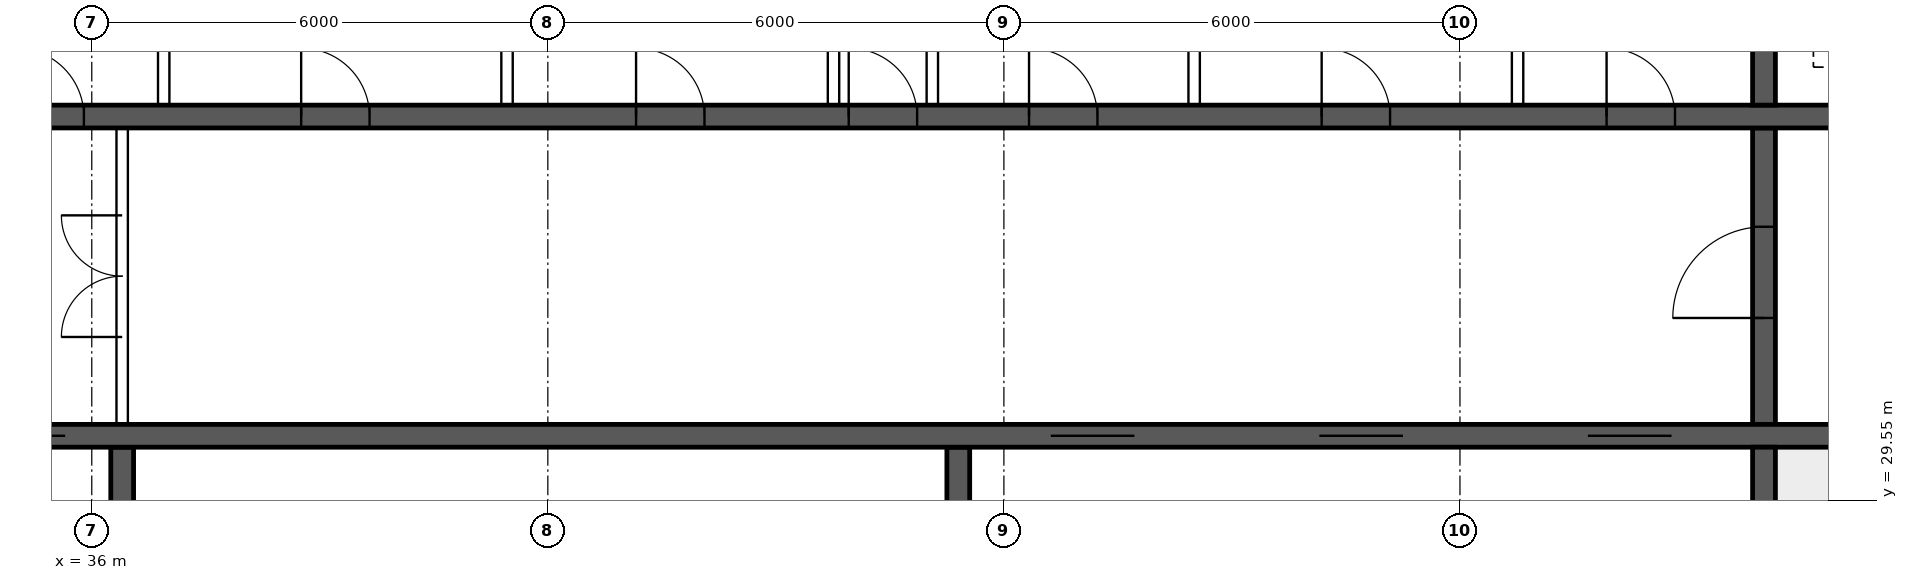
"""IFC4 building model, lengths in metres.
Left out: names, types, materials, properties, quantities, classifications, styles, units other than length and angle.
Written with IfcOpenShell. Run it as: python <this file> out.ifc"""

import sys

from ifc_helpers import new_model, si_unit, direction, frame, frame_2d, origin, place, context, subcontext, project, spatial, rectangle, extrude, element, fill, save


model = new_model("IFC4")
c1 = context("Model", 3, precision=1e-05, world=origin(), true_north=direction((0.0, 1.0)))
c2 = subcontext(c1, "Body", "Model", "MODEL_VIEW")
j1 = project(units=[si_unit("LENGTHUNIT", "METRE"), si_unit("PLANEANGLEUNIT", "RADIAN")], contexts=[c1])
p1 = place(None, origin())
s1 = spatial("IfcSite", under=j1, at=p1, CompositionType="ELEMENT")
p2 = place(p1, origin())
s2 = spatial("IfcBuilding", under=s1, at=p2, CompositionType="ELEMENT")
p3 = place(p2, frame((0.0, 0.0, 23.95)))
s3 = spatial("IfcBuildingStorey", under=s2, at=p3, CompositionType="ELEMENT", Elevation=23.95)
p4 = place(p3, frame((18.5, 30.4, 0.0), z_axis=(0.0, 0.0, 1.0), x_axis=(1.0, 0.0, 0.0)))
e1 = element("IfcWall", 1, at=p4, inside=s3, PredefinedType="SHEAR", context=c2, shape_type="SweptSolid", body=[
    extrude(rectangle(XDim=47.0, YDim=0.3, at=frame_2d((23.5, 0.0))), origin(), (0.0, 0.0, 1.0), 3.75),
])
p5 = place(p4, frame((0.4, 0.0, 0.0)))
e2 = element("IfcOpeningElement", 2, at=p5, cuts=e1, PredefinedType="OPENING", context=c2, shape_type="SweptSolid", body=[
    extrude(rectangle(XDim=1.0, YDim=2.1, at=frame_2d((0.5, 1.05))), frame((0.0, 0.16, 0.0), z_axis=(0.0, -1.0, 0.0), x_axis=(1.0, 0.0, 0.0)), (0.0, 0.0, 1.0), 0.32),
])
p6 = place(p4, frame((45.6, 0.0, 0.0)))
e3 = element("IfcOpeningElement", 3, at=p6, cuts=e1, PredefinedType="OPENING", context=c2, shape_type="SweptSolid", body=[
    extrude(rectangle(XDim=1.0, YDim=2.1, at=frame_2d((0.5, 1.05))), frame((0.0, 0.16, 0.0), z_axis=(0.0, -1.0, 0.0), x_axis=(1.0, 0.0, 0.0)), (0.0, 0.0, 1.0), 0.32),
])
p7 = place(p4, frame((8.25, 0.0, 0.0)))
e4 = element("IfcOpeningElement", 4, at=p7, cuts=e1, PredefinedType="OPENING", context=c2, shape_type="SweptSolid", body=[
    extrude(rectangle(XDim=1.1, YDim=2.1, at=frame_2d((0.55, 1.05))), frame((0.0, 0.16, 0.0), z_axis=(0.0, -1.0, 0.0), x_axis=(1.0, 0.0, 0.0)), (0.0, 0.0, 1.0), 0.32),
])
p8 = place(p4, frame((10.85, 0.0, 0.0)))
e5 = element("IfcOpeningElement", 5, at=p8, cuts=e1, PredefinedType="OPENING", context=c2, shape_type="SweptSolid", body=[
    extrude(rectangle(XDim=1.1, YDim=2.1, at=frame_2d((0.55, 1.05))), frame((0.0, 0.16, 0.0), z_axis=(0.0, -1.0, 0.0), x_axis=(1.0, 0.0, 0.0)), (0.0, 0.0, 1.0), 0.32),
])
p9 = place(p4, frame((13.45, 0.0, 0.0)))
e6 = element("IfcOpeningElement", 6, at=p9, cuts=e1, PredefinedType="OPENING", context=c2, shape_type="SweptSolid", body=[
    extrude(rectangle(XDim=1.1, YDim=2.1, at=frame_2d((0.55, 1.05))), frame((0.0, 0.16, 0.0), z_axis=(0.0, -1.0, 0.0), x_axis=(1.0, 0.0, 0.0)), (0.0, 0.0, 1.0), 0.32),
])
p10 = place(p4, frame((16.05, 0.0, 0.0)))
e7 = element("IfcOpeningElement", 7, at=p10, cuts=e1, PredefinedType="OPENING", context=c2, shape_type="SweptSolid", body=[
    extrude(rectangle(XDim=1.1, YDim=2.1, at=frame_2d((0.55, 1.05))), frame((0.0, 0.16, 0.0), z_axis=(0.0, -1.0, 0.0), x_axis=(1.0, 0.0, 0.0)), (0.0, 0.0, 1.0), 0.32),
])
p11 = place(p4, frame((30.117, 0.0, 0.0)))
e8 = element("IfcOpeningElement", 8, at=p11, cuts=e1, PredefinedType="OPENING", context=c2, shape_type="SweptSolid", body=[
    extrude(rectangle(XDim=1.1, YDim=2.1, at=frame_2d((0.55, 1.05))), frame((0.0, 0.16, 0.0), z_axis=(0.0, -1.0, 0.0), x_axis=(1.0, 0.0, 0.0)), (0.0, 0.0, 1.0), 0.32),
])
p12 = place(p4, frame((33.65, 0.0, 0.0)))
e9 = element("IfcOpeningElement", 9, at=p12, cuts=e1, PredefinedType="OPENING", context=c2, shape_type="SweptSolid", body=[
    extrude(rectangle(XDim=1.1, YDim=2.1, at=frame_2d((0.55, 1.05))), frame((0.0, 0.16, 0.0), z_axis=(0.0, -1.0, 0.0), x_axis=(1.0, 0.0, 0.0)), (0.0, 0.0, 1.0), 0.32),
])
p13 = place(p4, frame((37.183, 0.0, 0.0)))
e10 = element("IfcOpeningElement", 10, at=p13, cuts=e1, PredefinedType="OPENING", context=c2, shape_type="SweptSolid", body=[
    extrude(rectangle(XDim=1.1, YDim=2.1, at=frame_2d((0.55, 1.05))), frame((0.0, 0.16, 0.0), z_axis=(0.0, -1.0, 0.0), x_axis=(1.0, 0.0, 0.0)), (0.0, 0.0, 1.0), 0.32),
])
p14 = place(p3, frame((18.5, 34.6, 0.0), z_axis=(0.0, 0.0, 1.0), x_axis=(1.0, 0.0, 0.0)))
e11 = element("IfcWall", 11, at=p14, inside=s3, PredefinedType="SHEAR", context=c2, shape_type="SweptSolid", body=[
    extrude(rectangle(XDim=47.0, YDim=0.3, at=frame_2d((23.5, 0.0))), origin(), (0.0, 0.0, 1.0), 3.75),
])
p15 = place(p14, frame((0.9, 0.0, 0.0)))
e12 = element("IfcOpeningElement", 12, at=p15, cuts=e11, PredefinedType="OPENING", context=c2, shape_type="SweptSolid", body=[
    extrude(rectangle(XDim=1.1, YDim=2.1, at=frame_2d((0.55, 1.05))), frame((0.0, 0.16, 0.0), z_axis=(0.0, -1.0, 0.0), x_axis=(1.0, 0.0, 0.0)), (0.0, 0.0, 1.0), 0.32),
])
p16 = place(p14, frame((45.0, 0.0, 0.0)))
e13 = element("IfcOpeningElement", 13, at=p16, cuts=e11, PredefinedType="OPENING", context=c2, shape_type="SweptSolid", body=[
    extrude(rectangle(XDim=1.1, YDim=2.1, at=frame_2d((0.55, 1.05))), frame((0.0, 0.16, 0.0), z_axis=(0.0, -1.0, 0.0), x_axis=(1.0, 0.0, 0.0)), (0.0, 0.0, 1.0), 0.32),
])
p17 = place(p14, frame((4.1, 0.0, 0.0)))
e14 = element("IfcOpeningElement", 14, at=p17, cuts=e11, PredefinedType="OPENING", context=c2, shape_type="SweptSolid", body=[
    extrude(rectangle(XDim=0.9, YDim=2.1, at=frame_2d((0.45, 1.05))), frame((0.0, 0.16, 0.0), z_axis=(0.0, -1.0, 0.0), x_axis=(1.0, 0.0, 0.0)), (0.0, 0.0, 1.0), 0.32),
])
p18 = place(p14, frame((42.0, 0.0, 0.0)))
e15 = element("IfcOpeningElement", 15, at=p18, cuts=e11, PredefinedType="OPENING", context=c2, shape_type="SweptSolid", body=[
    extrude(rectangle(XDim=0.9, YDim=2.1, at=frame_2d((0.45, 1.05))), frame((0.0, 0.16, 0.0), z_axis=(0.0, -1.0, 0.0), x_axis=(1.0, 0.0, 0.0)), (0.0, 0.0, 1.0), 0.32),
])
p19 = place(p14, frame((8.875, 0.0, 0.0)))
e16 = element("IfcOpeningElement", 16, at=p19, cuts=e11, PredefinedType="OPENING", context=c2, shape_type="SweptSolid", body=[
    extrude(rectangle(XDim=0.9, YDim=2.1, at=frame_2d((0.45, 1.05))), frame((0.0, 0.16, 0.0), z_axis=(0.0, -1.0, 0.0), x_axis=(1.0, 0.0, 0.0)), (0.0, 0.0, 1.0), 0.32),
])
p20 = place(p14, frame((12.849, 0.0, 0.0)))
e17 = element("IfcOpeningElement", 17, at=p20, cuts=e11, PredefinedType="OPENING", context=c2, shape_type="SweptSolid", body=[
    extrude(rectangle(XDim=0.9, YDim=2.1, at=frame_2d((0.45, 1.05))), frame((0.0, 0.16, 0.0), z_axis=(0.0, -1.0, 0.0), x_axis=(1.0, 0.0, 0.0)), (0.0, 0.0, 1.0), 0.32),
])
p21 = place(p14, frame((16.496, 0.0, 0.0)))
e18 = element("IfcOpeningElement", 18, at=p21, cuts=e11, PredefinedType="OPENING", context=c2, shape_type="SweptSolid", body=[
    extrude(rectangle(XDim=0.9, YDim=2.1, at=frame_2d((0.45, 1.05))), frame((0.0, 0.16, 0.0), z_axis=(0.0, -1.0, 0.0), x_axis=(1.0, 0.0, 0.0)), (0.0, 0.0, 1.0), 0.32),
])
p22 = place(p14, frame((20.255, 0.0, 0.0)))
e19 = element("IfcOpeningElement", 19, at=p22, cuts=e11, PredefinedType="OPENING", context=c2, shape_type="SweptSolid", body=[
    extrude(rectangle(XDim=0.9, YDim=2.1, at=frame_2d((0.45, 1.05))), frame((0.0, 0.16, 0.0), z_axis=(0.0, -1.0, 0.0), x_axis=(1.0, 0.0, 0.0)), (0.0, 0.0, 1.0), 0.32),
])
p23 = place(p14, frame((24.661, 0.0, 0.0)))
e20 = element("IfcOpeningElement", 20, at=p23, cuts=e11, PredefinedType="OPENING", context=c2, shape_type="SweptSolid", body=[
    extrude(rectangle(XDim=0.9, YDim=2.1, at=frame_2d((0.45, 1.05))), frame((0.0, 0.16, 0.0), z_axis=(0.0, -1.0, 0.0), x_axis=(1.0, 0.0, 0.0)), (0.0, 0.0, 1.0), 0.32),
])
p24 = place(p14, frame((27.458, 0.0, 0.0)))
e21 = element("IfcOpeningElement", 21, at=p24, cuts=e11, PredefinedType="OPENING", context=c2, shape_type="SweptSolid", body=[
    extrude(rectangle(XDim=0.9, YDim=2.1, at=frame_2d((0.45, 1.05))), frame((0.0, 0.16, 0.0), z_axis=(0.0, -1.0, 0.0), x_axis=(1.0, 0.0, 0.0)), (0.0, 0.0, 1.0), 0.32),
])
p25 = place(p14, frame((29.831, 0.0, 0.0)))
e22 = element("IfcOpeningElement", 22, at=p25, cuts=e11, PredefinedType="OPENING", context=c2, shape_type="SweptSolid", body=[
    extrude(rectangle(XDim=0.9, YDim=2.1, at=frame_2d((0.45, 1.05))), frame((0.0, 0.16, 0.0), z_axis=(0.0, -1.0, 0.0), x_axis=(1.0, 0.0, 0.0)), (0.0, 0.0, 1.0), 0.32),
])
p26 = place(p14, frame((33.68, 0.0, 0.0)))
e23 = element("IfcOpeningElement", 23, at=p26, cuts=e11, PredefinedType="OPENING", context=c2, shape_type="SweptSolid", body=[
    extrude(rectangle(XDim=0.9, YDim=2.1, at=frame_2d((0.45, 1.05))), frame((0.0, 0.16, 0.0), z_axis=(0.0, -1.0, 0.0), x_axis=(1.0, 0.0, 0.0)), (0.0, 0.0, 1.0), 0.32),
])
p27 = place(p14, frame((37.429, 0.0, 0.0)))
e24 = element("IfcOpeningElement", 24, at=p27, cuts=e11, PredefinedType="OPENING", context=c2, shape_type="SweptSolid", body=[
    extrude(rectangle(XDim=0.9, YDim=2.1, at=frame_2d((0.45, 1.05))), frame((0.0, 0.16, 0.0), z_axis=(0.0, -1.0, 0.0), x_axis=(1.0, 0.0, 0.0)), (0.0, 0.0, 1.0), 0.32),
])
p28 = place(p3, frame((58.0, 26.3, 0.0), z_axis=(0.0, 0.0, 1.0), x_axis=(0.0, 1.0, 0.0)))
e25 = element("IfcWall", 25, at=p28, inside=s3, PredefinedType="SHEAR", context=c2, shape_type="SweptSolid", body=[
    extrude(rectangle(XDim=3.95, YDim=0.3, at=frame_2d((1.975, 0.0))), origin(), (0.0, 0.0, 1.0), 3.75),
])
p29 = place(p3, frame((58.0, 30.55, 0.0), z_axis=(0.0, 0.0, 1.0), x_axis=(0.0, 1.0, 0.0)))
e26 = element("IfcWall", 26, at=p29, inside=s3, PredefinedType="SHEAR", context=c2, shape_type="SweptSolid", body=[
    extrude(rectangle(XDim=3.9, YDim=0.3, at=frame_2d((1.95, 0.0))), origin(), (0.0, 0.0, 1.0), 3.75),
])
p30 = place(p29, frame((1.4, 0.0, 0.0)))
e27 = element("IfcOpeningElement", 27, at=p30, cuts=e26, PredefinedType="OPENING", context=c2, shape_type="SweptSolid", body=[
    extrude(rectangle(XDim=1.2, YDim=2.1, at=frame_2d((0.6, 1.05))), frame((0.0, 0.16, 0.0), z_axis=(0.0, -1.0, 0.0), x_axis=(1.0, 0.0, 0.0)), (0.0, 0.0, 1.0), 0.32),
])
p31 = place(p3, frame((58.0, 34.75, 0.0), z_axis=(0.0, 0.0, 1.0), x_axis=(0.0, 1.0, 0.0)))
e28 = element("IfcWall", 28, at=p31, inside=s3, PredefinedType="SHEAR", context=c2, shape_type="SweptSolid", body=[
    extrude(rectangle(XDim=2.95, YDim=0.3, at=frame_2d((1.475, 0.0))), origin(), (0.0, 0.0, 1.0), 3.75),
])
for number, where, z_axis, x_axis in (
    (29, (36.4, 26.3, 0.0), (0.0, 0.0, 1.0), (0.0, 1.0, 0.0)),
    (30, (47.4, 26.3, 0.0), (0.0, 0.0, 1.0), (0.0, 1.0, 0.0)),
):
    element("IfcWall", number, at=place(p3, frame(where, z_axis=z_axis, x_axis=x_axis)), inside=s3, PredefinedType="SHEAR", context=c2, shape_type="SweptSolid", body=[
        extrude(rectangle(XDim=3.95, YDim=0.3, at=frame_2d((1.975, 0.0))), origin(), (0.0, 0.0, 1.0), 3.75),
    ])
p32 = place(p3, frame((36.4, 30.55, 0.0), z_axis=(0.0, 0.0, 1.0), x_axis=(0.0, 1.0, 0.0)))
e31 = element("IfcWall", 31, at=p32, inside=s3, PredefinedType="SOLIDWALL", context=c2, shape_type="SweptSolid", body=[
    extrude(rectangle(XDim=3.9, YDim=0.15, at=frame_2d((1.95, 0.0))), origin(), (0.0, 0.0, 1.0), 3.5),
])
p33 = place(p32, frame((1.15, 0.0, 0.0)))
e32 = element("IfcOpeningElement", 32, at=p33, cuts=e31, PredefinedType="OPENING", context=c2, shape_type="SweptSolid", body=[
    extrude(rectangle(XDim=1.6, YDim=2.1, at=frame_2d((0.8, 1.05))), frame((0.0, 0.085, 0.0), z_axis=(0.0, -1.0, 0.0), x_axis=(1.0, 0.0, 0.0)), (0.0, 0.0, 1.0), 0.17),
])
for number, where, z_axis, x_axis in (
    (33, (36.946, 34.75, 0.0), (0.0, 0.0, 1.0), (0.0, 1.0, 0.0)),
    (34, (41.463, 34.75, 0.0), (0.0, 0.0, 1.0), (0.0, 1.0, 0.0)),
    (35, (45.758, 34.75, 0.0), (0.0, 0.0, 1.0), (0.0, 1.0, 0.0)),
    (36, (47.058, 34.75, 0.0), (0.0, 0.0, 1.0), (0.0, 1.0, 0.0)),
    (37, (50.503, 34.75, 0.0), (0.0, 0.0, 1.0), (0.0, 1.0, 0.0)),
    (38, (54.758, 34.75, 0.0), (0.0, 0.0, 1.0), (0.0, 1.0, 0.0)),
):
    element("IfcWall", number, at=place(p3, frame(where, z_axis=z_axis, x_axis=x_axis)), inside=s3, PredefinedType="SOLIDWALL", context=c2, shape_type="SweptSolid", body=[
        extrude(rectangle(XDim=2.95, YDim=0.15, at=frame_2d((1.475, 0.0))), origin(), (0.0, 0.0, 1.0), 3.5),
    ])
p34 = place(p33, origin())
e39 = element("IfcDoor", 39, at=p34, inside=s3, OperationType="DOUBLE_DOOR_SINGLE_SWING", PredefinedType="DOOR", context=c2, shape_type="SweptSolid", body=[
    extrude(rectangle(XDim=1.6, YDim=2.1, at=frame_2d((0.8, 1.05))), frame((0.0, 0.025, 0.0), z_axis=(0.0, -1.0, 0.0), x_axis=(1.0, 0.0, 0.0)), (0.0, 0.0, 1.0), 0.05),
])
fill(e32, e39)
p35 = place(p30, origin())
e40 = element("IfcDoor", 40, at=p35, inside=s3, OperationType="SINGLE_SWING_LEFT", PredefinedType="DOOR", context=c2, shape_type="SweptSolid", body=[
    extrude(rectangle(XDim=1.2, YDim=2.1, at=frame_2d((0.6, 1.05))), frame((0.0, 0.025, 0.0), z_axis=(0.0, -1.0, 0.0), x_axis=(1.0, 0.0, 0.0)), (0.0, 0.0, 1.0), 0.05),
])
fill(e27, e40)
p36 = place(p21, origin())
e41 = element("IfcDoor", 41, at=p36, inside=s3, OperationType="SINGLE_SWING_LEFT", PredefinedType="DOOR", context=c2, shape_type="SweptSolid", body=[
    extrude(rectangle(XDim=0.9, YDim=2.1, at=frame_2d((0.45, 1.05))), frame((0.0, 0.025, 0.0), z_axis=(0.0, -1.0, 0.0), x_axis=(1.0, 0.0, 0.0)), (0.0, 0.0, 1.0), 0.05),
])
fill(e18, e41)
p37 = place(p22, origin())
e42 = element("IfcDoor", 42, at=p37, inside=s3, OperationType="SINGLE_SWING_LEFT", PredefinedType="DOOR", context=c2, shape_type="SweptSolid", body=[
    extrude(rectangle(XDim=0.9, YDim=2.1, at=frame_2d((0.45, 1.05))), frame((0.0, 0.025, 0.0), z_axis=(0.0, -1.0, 0.0), x_axis=(1.0, 0.0, 0.0)), (0.0, 0.0, 1.0), 0.05),
])
fill(e19, e42)
p38 = place(p23, origin())
e43 = element("IfcDoor", 43, at=p38, inside=s3, OperationType="SINGLE_SWING_LEFT", PredefinedType="DOOR", context=c2, shape_type="SweptSolid", body=[
    extrude(rectangle(XDim=0.9, YDim=2.1, at=frame_2d((0.45, 1.05))), frame((0.0, 0.025, 0.0), z_axis=(0.0, -1.0, 0.0), x_axis=(1.0, 0.0, 0.0)), (0.0, 0.0, 1.0), 0.05),
])
fill(e20, e43)
p39 = place(p24, origin())
e44 = element("IfcDoor", 44, at=p39, inside=s3, OperationType="SINGLE_SWING_LEFT", PredefinedType="DOOR", context=c2, shape_type="SweptSolid", body=[
    extrude(rectangle(XDim=0.9, YDim=2.1, at=frame_2d((0.45, 1.05))), frame((0.0, 0.025, 0.0), z_axis=(0.0, -1.0, 0.0), x_axis=(1.0, 0.0, 0.0)), (0.0, 0.0, 1.0), 0.05),
])
fill(e21, e44)
p40 = place(p25, origin())
e45 = element("IfcDoor", 45, at=p40, inside=s3, OperationType="SINGLE_SWING_LEFT", PredefinedType="DOOR", context=c2, shape_type="SweptSolid", body=[
    extrude(rectangle(XDim=0.9, YDim=2.1, at=frame_2d((0.45, 1.05))), frame((0.0, 0.025, 0.0), z_axis=(0.0, -1.0, 0.0), x_axis=(1.0, 0.0, 0.0)), (0.0, 0.0, 1.0), 0.05),
])
fill(e22, e45)
p41 = place(p26, origin())
e46 = element("IfcDoor", 46, at=p41, inside=s3, OperationType="SINGLE_SWING_LEFT", PredefinedType="DOOR", context=c2, shape_type="SweptSolid", body=[
    extrude(rectangle(XDim=0.9, YDim=2.1, at=frame_2d((0.45, 1.05))), frame((0.0, 0.025, 0.0), z_axis=(0.0, -1.0, 0.0), x_axis=(1.0, 0.0, 0.0)), (0.0, 0.0, 1.0), 0.05),
])
fill(e23, e46)
p42 = place(p27, origin())
e47 = element("IfcDoor", 47, at=p42, inside=s3, OperationType="SINGLE_SWING_LEFT", PredefinedType="DOOR", context=c2, shape_type="SweptSolid", body=[
    extrude(rectangle(XDim=0.9, YDim=2.1, at=frame_2d((0.45, 1.05))), frame((0.0, 0.025, 0.0), z_axis=(0.0, -1.0, 0.0), x_axis=(1.0, 0.0, 0.0)), (0.0, 0.0, 1.0), 0.05),
])
fill(e24, e47)
p43 = place(p10, origin())
e48 = element("IfcDoor", 48, at=p43, inside=s3, OperationType="DOUBLE_DOOR_SLIDING", PredefinedType="DOOR", context=c2, shape_type="SweptSolid", body=[
    extrude(rectangle(XDim=1.1, YDim=2.1, at=frame_2d((0.55, 1.05))), frame((0.0, 0.025, 0.0), z_axis=(0.0, -1.0, 0.0), x_axis=(1.0, 0.0, 0.0)), (0.0, 0.0, 1.0), 0.05),
])
fill(e7, e48)
p44 = place(p11, origin())
e49 = element("IfcDoor", 49, at=p44, inside=s3, OperationType="DOUBLE_DOOR_SLIDING", PredefinedType="DOOR", context=c2, shape_type="SweptSolid", body=[
    extrude(rectangle(XDim=1.1, YDim=2.1, at=frame_2d((0.55, 1.05))), frame((0.0, 0.025, 0.0), z_axis=(0.0, -1.0, 0.0), x_axis=(1.0, 0.0, 0.0)), (0.0, 0.0, 1.0), 0.05),
])
fill(e8, e49)
p45 = place(p12, origin())
e50 = element("IfcDoor", 50, at=p45, inside=s3, OperationType="DOUBLE_DOOR_SLIDING", PredefinedType="DOOR", context=c2, shape_type="SweptSolid", body=[
    extrude(rectangle(XDim=1.1, YDim=2.1, at=frame_2d((0.55, 1.05))), frame((0.0, 0.025, 0.0), z_axis=(0.0, -1.0, 0.0), x_axis=(1.0, 0.0, 0.0)), (0.0, 0.0, 1.0), 0.05),
])
fill(e9, e50)
p46 = place(p13, origin())
e51 = element("IfcDoor", 51, at=p46, inside=s3, OperationType="DOUBLE_DOOR_SLIDING", PredefinedType="DOOR", context=c2, shape_type="SweptSolid", body=[
    extrude(rectangle(XDim=1.1, YDim=2.1, at=frame_2d((0.55, 1.05))), frame((0.0, 0.025, 0.0), z_axis=(0.0, -1.0, 0.0), x_axis=(1.0, 0.0, 0.0)), (0.0, 0.0, 1.0), 0.05),
])
fill(e10, e51)
save(model, sys.argv[1])
